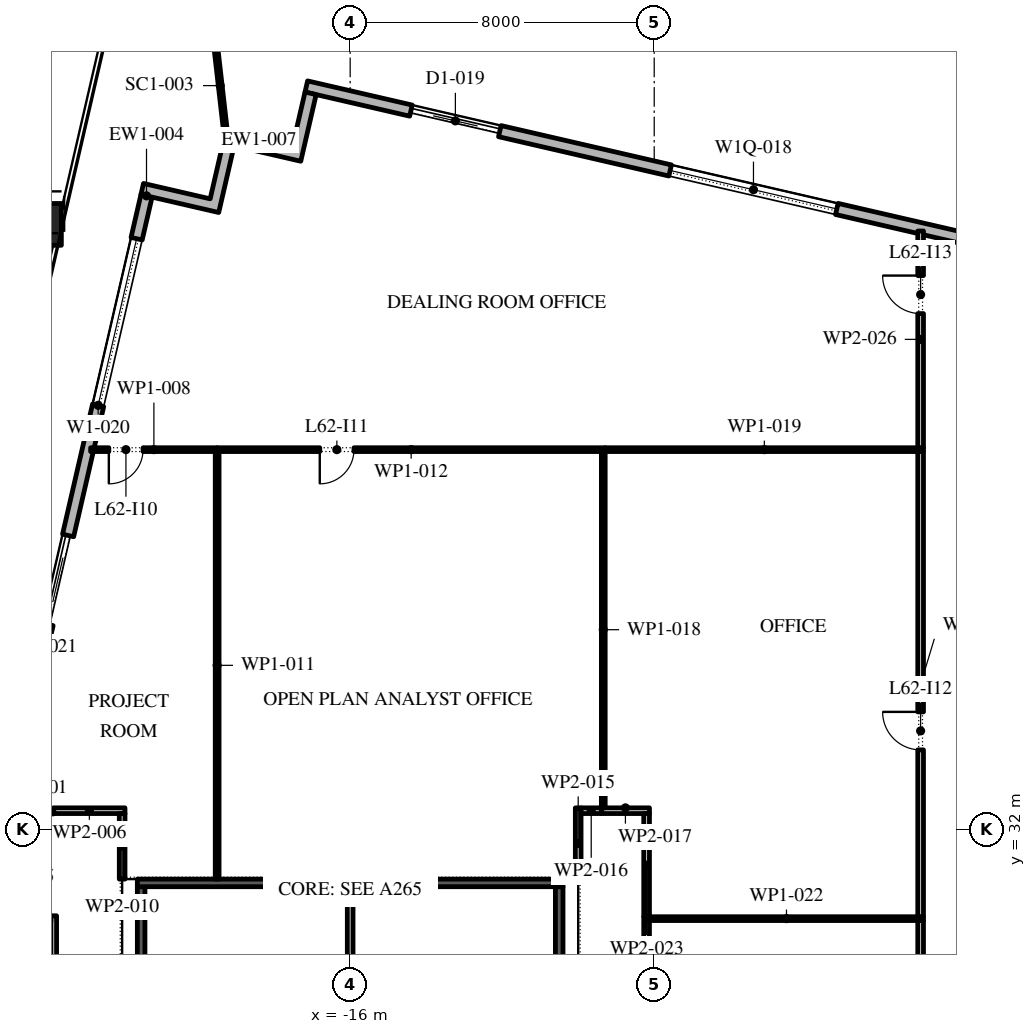
"""IFC4 building model, lengths in metres.
Left out: names, types, materials, properties, quantities, classifications, styles, units other than length and angle.
Written with IfcOpenShell. Run it as: python <this file> out.ifc"""

import sys

from ifc_helpers import new_model, si_unit, direction, frame, frame_2d, origin, origin_2d, place, context, subcontext, project, spatial, polyline, rectangle, outline, extrude, element, fill, save


model = new_model("IFC4")
c1 = context("Model", 3, precision=1e-05, world=origin(), true_north=direction((0.0, 1.0)))
c2 = subcontext(c1, "Body", "Model", "MODEL_VIEW")
j1 = project(units=[si_unit("LENGTHUNIT", "METRE"), si_unit("PLANEANGLEUNIT", "RADIAN")], contexts=[c1])
p1 = place(None, origin())
s1 = spatial("IfcSite", under=j1, at=p1, CompositionType="ELEMENT")
p2 = place(p1, origin())
s2 = spatial("IfcBuilding", under=s1, at=p2, CompositionType="ELEMENT")
p3 = place(p2, frame((0.0, 0.0, 285.0)))
s3 = spatial("IfcBuildingStorey", under=s2, at=p3, CompositionType="ELEMENT", Elevation=285.0)
p4 = place(p3, frame((-24.149, 47.927, 0.0), z_axis=(0.017502025619, 0.075687567741, 0.996977969259), x_axis=(-0.974290512438, 0.225295355862, 0.0)))
e1 = element("IfcColumn", 1, at=p4, inside=s3, PredefinedType="COLUMN", context=c2, shape_type="SweptSolid", body=[
    extrude(rectangle(XDim=1.1, YDim=1.1, at=origin_2d()), origin(), (0.0, 0.0, 1.0), 4.213),
])
p5 = place(p3, frame((29.616, 40.758, 0.0), z_axis=(0.0, 0.0, 1.0), x_axis=(-0.974370532314, 0.224949029246, 0.0)))
e2 = element("IfcWall", 2, at=p5, inside=s3, PredefinedType="STANDARD", context=c2, shape_type="SweptSolid", body=[
    extrude(rectangle(XDim=48.0, YDim=0.3, at=frame_2d((24.0, 0.0))), origin(), (0.0, 0.0, 1.0), 4.0),
])
p6 = place(p5, frame((1.625, 0.0, 0.45)))
e3 = element("IfcOpeningElement", 3, at=p6, cuts=e2, PredefinedType="OPENING", context=c2, shape_type="SweptSolid", body=[
    extrude(rectangle(XDim=4.5, YDim=2.525, at=frame_2d((2.25, 1.262))), frame((0.0, 0.16, 0.0), z_axis=(0.0, -1.0, 0.0), x_axis=(1.0, 0.0, 0.0)), (0.0, 0.0, 1.0), 0.32),
])
p7 = place(p5, frame((10.575, 0.0, 0.0)))
e4 = element("IfcOpeningElement", 4, at=p7, cuts=e2, PredefinedType="OPENING", context=c2, shape_type="SweptSolid", body=[
    extrude(rectangle(XDim=2.4, YDim=3.5, at=frame_2d((1.2, 1.75))), frame((0.0, 0.16, 0.0), z_axis=(0.0, -1.0, 0.0), x_axis=(1.0, 0.0, 0.0)), (0.0, 0.0, 1.0), 0.32),
])
p8 = place(p5, frame((17.575, 0.0, 0.45)))
e5 = element("IfcOpeningElement", 5, at=p8, cuts=e2, PredefinedType="OPENING", context=c2, shape_type="SweptSolid", body=[
    extrude(rectangle(XDim=4.5, YDim=2.45, at=frame_2d((2.25, 1.225))), frame((0.0, 0.16, 0.0), z_axis=(0.0, -1.0, 0.0), x_axis=(1.0, 0.0, 0.0)), (0.0, 0.0, 1.0), 0.32),
])
p9 = place(p5, frame((25.625, 0.0, 0.45)))
e6 = element("IfcOpeningElement", 6, at=p9, cuts=e2, PredefinedType="OPENING", context=c2, shape_type="SweptSolid", body=[
    extrude(rectangle(XDim=4.5, YDim=2.45, at=frame_2d((2.25, 1.225))), frame((0.0, 0.16, 0.0), z_axis=(0.0, -1.0, 0.0), x_axis=(1.0, 0.0, 0.0)), (0.0, 0.0, 1.0), 0.32),
])
p10 = place(p5, frame((33.675, 0.0, 0.45)))
e7 = element("IfcOpeningElement", 7, at=p10, cuts=e2, PredefinedType="OPENING", context=c2, shape_type="SweptSolid", body=[
    extrude(rectangle(XDim=4.5, YDim=2.45, at=frame_2d((2.25, 1.225))), frame((0.0, 0.16, 0.0), z_axis=(0.0, -1.0, 0.0), x_axis=(1.0, 0.0, 0.0)), (0.0, 0.0, 1.0), 0.32),
])
p11 = place(p5, frame((42.775, 0.0, 0.0)))
e8 = element("IfcOpeningElement", 8, at=p11, cuts=e2, PredefinedType="OPENING", context=c2, shape_type="SweptSolid", body=[
    extrude(rectangle(XDim=2.4, YDim=3.5, at=frame_2d((1.2, 1.75))), frame((0.0, 0.16, 0.0), z_axis=(0.0, -1.0, 0.0), x_axis=(1.0, 0.0, 0.0)), (0.0, 0.0, 1.0), 0.32),
])
p12 = place(p3, frame((-21.359, 48.678, 0.0), z_axis=(0.0, 0.0, 1.0), x_axis=(-0.224949198343, -0.974370493275, 0.0)))
e9 = element("IfcWall", 9, at=p12, inside=s3, PredefinedType="STANDARD", context=c2, shape_type="SweptSolid", body=[
    extrude(rectangle(XDim=49.5, YDim=0.3, at=frame_2d((24.75, 0.0))), origin(), (0.0, 0.0, 1.0), 4.0),
])
p13 = place(p12, frame((1.157, 0.0, 0.45)))
e10 = element("IfcOpeningElement", 10, at=p13, cuts=e9, PredefinedType="OPENING", context=c2, shape_type="SweptSolid", body=[
    extrude(rectangle(XDim=4.5, YDim=3.05, at=frame_2d((2.25, 1.525))), frame((0.0, 0.16, 0.0), z_axis=(0.0, -1.0, 0.0), x_axis=(1.0, 0.0, 0.0)), (0.0, 0.0, 1.0), 0.32),
])
p14 = place(p12, frame((9.171, 0.0, 0.0)))
e11 = element("IfcOpeningElement", 11, at=p14, cuts=e9, PredefinedType="OPENING", context=c2, shape_type="SweptSolid", body=[
    extrude(rectangle(XDim=2.4, YDim=3.5, at=frame_2d((1.2, 1.75))), frame((0.0, 0.16, 0.0), z_axis=(0.0, -1.0, 0.0), x_axis=(1.0, 0.0, 0.0)), (0.0, 0.0, 1.0), 0.32),
])
p15 = place(p12, frame((15.236, 0.0, 0.45)))
e12 = element("IfcOpeningElement", 12, at=p15, cuts=e9, PredefinedType="OPENING", context=c2, shape_type="SweptSolid", body=[
    extrude(rectangle(XDim=4.5, YDim=3.05, at=frame_2d((2.25, 1.525))), frame((0.0, 0.16, 0.0), z_axis=(0.0, -1.0, 0.0), x_axis=(1.0, 0.0, 0.0)), (0.0, 0.0, 1.0), 0.32),
])
p16 = place(p12, frame((22.35, 0.0, 0.45)))
e13 = element("IfcOpeningElement", 13, at=p16, cuts=e9, PredefinedType="OPENING", context=c2, shape_type="SweptSolid", body=[
    extrude(rectangle(XDim=4.5, YDim=3.05, at=frame_2d((2.25, 1.525))), frame((0.0, 0.16, 0.0), z_axis=(0.0, -1.0, 0.0), x_axis=(1.0, 0.0, 0.0)), (0.0, 0.0, 1.0), 0.32),
])
p17 = place(p12, frame((29.464, 0.0, 0.45)))
e14 = element("IfcOpeningElement", 14, at=p17, cuts=e9, PredefinedType="OPENING", context=c2, shape_type="SweptSolid", body=[
    extrude(rectangle(XDim=4.5, YDim=3.05, at=frame_2d((2.25, 1.525))), frame((0.0, 0.16, 0.0), z_axis=(0.0, -1.0, 0.0), x_axis=(1.0, 0.0, 0.0)), (0.0, 0.0, 1.0), 0.32),
])
p18 = place(p12, frame((37.628, 0.0, 0.0)))
e15 = element("IfcOpeningElement", 15, at=p18, cuts=e9, PredefinedType="OPENING", context=c2, shape_type="SweptSolid", body=[
    extrude(rectangle(XDim=2.4, YDim=3.325, at=frame_2d((1.2, 1.663))), frame((0.0, 0.16, 0.0), z_axis=(0.0, -1.0, 0.0), x_axis=(1.0, 0.0, 0.0)), (0.0, 0.0, 1.0), 0.32),
])
p19 = place(p12, frame((43.693, 0.0, 0.45)))
e16 = element("IfcOpeningElement", 16, at=p19, cuts=e9, PredefinedType="OPENING", context=c2, shape_type="SweptSolid", body=[
    extrude(rectangle(XDim=4.5, YDim=2.825, at=frame_2d((2.25, 1.413))), frame((0.0, 0.16, 0.0), z_axis=(0.0, -1.0, 0.0), x_axis=(1.0, 0.0, 0.0)), (0.0, 0.0, 1.0), 0.32),
])
p20 = place(p3, origin())
e17 = element("IfcWall", 17, at=p20, inside=s3, PredefinedType="STANDARD", context=c2, shape_type="SweptSolid", body=[
    extrude(outline(polyline([(-21.505, 48.712), (-21.438, 49.004), (-19.684, 48.599), (-19.279, 50.353), (-17.525, 49.948), (-17.188, 51.41), (-16.895, 51.342), (-17.3, 49.588), (-19.054, 49.993), (-19.459, 48.24), (-21.505, 48.712)])), origin(), (0.0, 0.0, 1.0), 4.0),
])
p21 = place(p3, frame((-19.279, 50.353, -0.05), z_axis=(0.0, 0.0, 1.0), x_axis=(-0.113767195916, 0.993507435872, 0.0)))
e18 = element("IfcWall", 18, at=p21, inside=s3, PredefinedType="STANDARD", context=c2, shape_type="SweptSolid", body=[
    extrude(rectangle(XDim=2.466, YDim=0.1, at=frame_2d((1.233, 0.0))), origin(), (0.0, 0.0, 1.0), 4.05),
])
p22 = place(p3, frame((-21.5, 25.75, 0.0), z_axis=(0.0, 0.0, 1.0), x_axis=(0.0, 1.0, 0.0)))
e19 = element("IfcWall", 19, at=p22, inside=s3, PredefinedType="SHEAR", context=c2, shape_type="SweptSolid", body=[
    extrude(rectangle(XDim=4.75, YDim=0.2, at=frame_2d((2.375, 0.0))), origin(), (0.0, 0.0, 1.0), 4.0),
])
p23 = place(p22, frame((1.925, 0.0, 0.0)))
e20 = element("IfcOpeningElement", 20, at=p23, cuts=e19, PredefinedType="OPENING", context=c2, shape_type="SweptSolid", body=[
    extrude(rectangle(XDim=0.9, YDim=2.1, at=frame_2d((0.45, 1.05))), frame((0.0, 0.11, 0.0), z_axis=(0.0, -1.0, 0.0), x_axis=(1.0, 0.0, 0.0)), (0.0, 0.0, 1.0), 0.22),
])
p24 = place(p3, frame((-10.5, 25.75, 0.0), z_axis=(0.0, 0.0, 1.0), x_axis=(0.0, 1.0, 0.0)))
e21 = element("IfcWall", 21, at=p24, inside=s3, PredefinedType="SHEAR", context=c2, shape_type="SweptSolid", body=[
    extrude(rectangle(XDim=4.75, YDim=0.2, at=frame_2d((2.375, 0.0))), origin(), (0.0, 0.0, 1.0), 4.0),
])
p25 = place(p24, frame((1.925, 0.0, 0.0)))
e22 = element("IfcOpeningElement", 22, at=p25, cuts=e21, PredefinedType="OPENING", context=c2, shape_type="SweptSolid", body=[
    extrude(rectangle(XDim=0.9, YDim=2.1, at=frame_2d((0.45, 1.05))), frame((0.0, 0.11, 0.0), z_axis=(0.0, -1.0, 0.0), x_axis=(1.0, 0.0, 0.0)), (0.0, 0.0, 1.0), 0.22),
])
p26 = place(p3, frame((-21.6, 30.6, 0.0), z_axis=(0.0, 0.0, 1.0), x_axis=(1.0, 0.0, 0.0)))
e23 = element("IfcWall", 23, at=p26, inside=s3, PredefinedType="SHEAR", context=c2, shape_type="SweptSolid", body=[
    extrude(rectangle(XDim=11.2, YDim=0.2, at=frame_2d((5.6, 0.0))), origin(), (0.0, 0.0, 1.0), 4.0),
])
p27 = place(p3, frame((-16.0, 25.75, 0.0), z_axis=(0.0, 0.0, 1.0), x_axis=(0.0, 1.0, 0.0)))
e24 = element("IfcWall", 24, at=p27, inside=s3, PredefinedType="PARTITIONING", context=c2, shape_type="SweptSolid", body=[
    extrude(rectangle(XDim=4.75, YDim=0.15, at=frame_2d((2.375, 0.0))), origin(), (0.0, 0.0, 1.0), 4.0),
])
p28 = place(p3, frame((-25.025, 32.49, 0.0), z_axis=(0.0, 0.0, 1.0), x_axis=(1.0, 0.0, 0.0)))
e25 = element("IfcWall", 25, at=p28, inside=s3, PredefinedType="PARTITIONING", context=c2, shape_type="SweptSolid", body=[
    extrude(rectangle(XDim=1.225, YDim=0.15, at=frame_2d((0.612, 0.0))), origin(), (0.0, 0.0, 1.0), 4.0),
])
p29 = place(p3, frame((-23.8, 8.86, 0.0), z_axis=(0.0, 0.0, 1.0), x_axis=(0.0, 1.0, 0.0)))
e26 = element("IfcWall", 26, at=p29, inside=s3, PredefinedType="PARTITIONING", context=c2, shape_type="SweptSolid", body=[
    extrude(rectangle(XDim=20.875, YDim=0.15, at=frame_2d((10.438, 0.0))), origin(), (0.0, 0.0, 1.0), 4.0),
])
p30 = place(p29, frame((7.9, 0.0, 0.0)))
e27 = element("IfcOpeningElement", 27, at=p30, cuts=e26, PredefinedType="OPENING", context=c2, shape_type="SweptSolid", body=[
    extrude(rectangle(XDim=1.0, YDim=2.1, at=frame_2d((0.5, 1.05))), frame((0.0, 0.085, 0.0), z_axis=(0.0, -1.0, 0.0), x_axis=(1.0, 0.0, 0.0)), (0.0, 0.0, 1.0), 0.17),
])
p31 = place(p3, frame((-23.8, 32.5, 0.0), z_axis=(0.0, 0.0, 1.0), x_axis=(1.0, 0.0, 0.0)))
e28 = element("IfcWall", 28, at=p31, inside=s3, PredefinedType="PARTITIONING", context=c2, shape_type="SweptSolid", body=[
    extrude(rectangle(XDim=1.875, YDim=0.15, at=frame_2d((0.938, 0.0))), origin(), (0.0, 0.0, 1.0), 4.0),
])
p32 = place(p3, frame((-22.829, 42.0, 0.0), z_axis=(0.0, 0.0, 1.0), x_axis=(1.0, 0.0, 0.0)))
e29 = element("IfcWall", 29, at=p32, inside=s3, PredefinedType="PARTITIONING", context=c2, shape_type="SweptSolid", body=[
    extrude(rectangle(XDim=3.329, YDim=0.1, at=frame_2d((1.665, 0.0))), origin(), (0.0, 0.0, 1.0), 4.0),
])
p33 = place(p32, frame((0.479, 0.0, 0.0)))
e30 = element("IfcOpeningElement", 30, at=p33, cuts=e29, PredefinedType="OPENING", context=c2, shape_type="SweptSolid", body=[
    extrude(rectangle(XDim=0.9, YDim=2.1, at=frame_2d((0.45, 1.05))), frame((0.0, 0.06, 0.0), z_axis=(0.0, -1.0, 0.0), x_axis=(1.0, 0.0, 0.0)), (0.0, 0.0, 1.0), 0.12),
])
p34 = place(p3, frame((-22.0, 32.425, 0.0), z_axis=(0.0, 0.0, 1.0), x_axis=(0.0, -1.0, 0.0)))
e31 = element("IfcWall", 31, at=p34, inside=s3, PredefinedType="PARTITIONING", context=c2, shape_type="SweptSolid", body=[
    extrude(rectangle(XDim=1.725, YDim=0.15, at=frame_2d((0.863, 0.0))), origin(), (0.0, 0.0, 1.0), 4.0),
])
p35 = place(p3, frame((-19.5, 41.95, 0.0), z_axis=(0.0, 0.0, 1.0), x_axis=(0.0, -1.0, 0.0)))
e32 = element("IfcWall", 32, at=p35, inside=s3, PredefinedType="PARTITIONING", context=c2, shape_type="SweptSolid", body=[
    extrude(rectangle(XDim=11.25, YDim=0.1, at=frame_2d((5.625, 0.0))), origin(), (0.0, 0.0, 1.0), 4.0),
])
p36 = place(p3, frame((-19.5, 42.0, 0.0), z_axis=(0.0, 0.0, 1.0), x_axis=(1.0, 0.0, 0.0)))
e33 = element("IfcWall", 33, at=p36, inside=s3, PredefinedType="PARTITIONING", context=c2, shape_type="SweptSolid", body=[
    extrude(rectangle(XDim=10.21, YDim=0.1, at=frame_2d((5.105, 0.0))), origin(), (0.0, 0.0, 1.0), 4.0),
])
p37 = place(p36, frame((2.7, 0.0, 0.0)))
e34 = element("IfcOpeningElement", 34, at=p37, cuts=e33, PredefinedType="OPENING", context=c2, shape_type="SweptSolid", body=[
    extrude(rectangle(XDim=0.9, YDim=2.1, at=frame_2d((0.45, 1.05))), frame((0.0, 0.06, 0.0), z_axis=(0.0, -1.0, 0.0), x_axis=(1.0, 0.0, 0.0)), (0.0, 0.0, 1.0), 0.12),
])
p38 = place(p3, frame((-10.0, 30.7, 0.0), z_axis=(0.0, 0.0, 1.0), x_axis=(0.0, 1.0, 0.0)))
e35 = element("IfcWall", 35, at=p38, inside=s3, PredefinedType="PARTITIONING", context=c2, shape_type="SweptSolid", body=[
    extrude(rectangle(XDim=1.875, YDim=0.15, at=frame_2d((0.938, 0.0))), origin(), (0.0, 0.0, 1.0), 4.0),
])
p39 = place(p3, frame((-9.925, 32.5, 0.0), z_axis=(0.0, 0.0, 1.0), x_axis=(1.0, 0.0, 0.0)))
e36 = element("IfcWall", 36, at=p39, inside=s3, PredefinedType="PARTITIONING", context=c2, shape_type="SweptSolid", body=[
    extrude(rectangle(XDim=0.535, YDim=0.15, at=frame_2d((0.268, 0.0))), origin(), (0.0, 0.0, 1.0), 4.0),
])
p40 = place(p3, frame((-9.39, 32.5, 0.0), z_axis=(0.0, 0.0, 1.0), x_axis=(1.0, 0.0, 0.0)))
e37 = element("IfcWall", 37, at=p40, inside=s3, PredefinedType="PARTITIONING", context=c2, shape_type="SweptSolid", body=[
    extrude(rectangle(XDim=1.265, YDim=0.15, at=frame_2d((0.632, 0.0))), origin(), (0.0, 0.0, 1.0), 4.0),
])
p41 = place(p3, frame((-9.34, 41.95, 0.0), z_axis=(0.0, 0.0, 1.0), x_axis=(0.0, -1.0, 0.0)))
e38 = element("IfcWall", 38, at=p41, inside=s3, PredefinedType="PARTITIONING", context=c2, shape_type="SweptSolid", body=[
    extrude(rectangle(XDim=9.375, YDim=0.1, at=frame_2d((4.688, 0.0))), origin(), (0.0, 0.0, 1.0), 4.0),
])
p42 = place(p3, frame((-9.29, 42.0, 0.0), z_axis=(0.0, 0.0, 1.0), x_axis=(1.0, 0.0, 0.0)))
e39 = element("IfcWall", 39, at=p42, inside=s3, PredefinedType="PARTITIONING", context=c2, shape_type="SweptSolid", body=[
    extrude(rectangle(XDim=8.375, YDim=0.1, at=frame_2d((4.188, 0.0))), origin(), (0.0, 0.0, 1.0), 4.0),
])
p43 = place(p3, frame((-8.2, 29.71, 0.0), z_axis=(0.0, 0.0, 1.0), x_axis=(0.0, -1.0, 0.0)))
e40 = element("IfcWall", 40, at=p43, inside=s3, PredefinedType="PARTITIONING", context=c2, shape_type="SweptSolid", body=[
    extrude(rectangle(XDim=10.635, YDim=0.15, at=frame_2d((5.317, 0.0))), origin(), (0.0, 0.0, 1.0), 4.0),
])
p44 = place(p43, frame((2.81, 0.0, 0.0)))
e41 = element("IfcOpeningElement", 41, at=p44, cuts=e40, PredefinedType="OPENING", context=c2, shape_type="SweptSolid", body=[
    extrude(rectangle(XDim=1.0, YDim=2.1, at=frame_2d((0.5, 1.05))), frame((0.0, 0.085, 0.0), z_axis=(0.0, -1.0, 0.0), x_axis=(1.0, 0.0, 0.0)), (0.0, 0.0, 1.0), 0.17),
])
p45 = place(p3, frame((-8.125, 29.66, 0.0), z_axis=(0.0, 0.0, 1.0), x_axis=(1.0, 0.0, 0.0)))
e42 = element("IfcWall", 42, at=p45, inside=s3, PredefinedType="PARTITIONING", context=c2, shape_type="SweptSolid", body=[
    extrude(rectangle(XDim=7.21, YDim=0.1, at=frame_2d((3.605, 0.0))), origin(), (0.0, 0.0, 1.0), 4.0),
])
p46 = place(p3, frame((-8.2, 32.425, 0.0), z_axis=(0.0, 0.0, 1.0), x_axis=(0.0, -1.0, 0.0)))
e43 = element("IfcWall", 43, at=p46, inside=s3, PredefinedType="PARTITIONING", context=c2, shape_type="SweptSolid", body=[
    extrude(rectangle(XDim=2.715, YDim=0.15, at=frame_2d((1.357, 0.0))), origin(), (0.0, 0.0, 1.0), 4.0),
])
p47 = place(p3, frame((-0.99, 19.075, 0.0), z_axis=(0.0, 0.0, 1.0), x_axis=(0.0, 1.0, 0.0)))
e44 = element("IfcWall", 44, at=p47, inside=s3, PredefinedType="PARTITIONING", context=c2, shape_type="SweptSolid", body=[
    extrude(rectangle(XDim=10.535, YDim=0.15, at=frame_2d((5.268, 0.0))), origin(), (0.0, 0.0, 1.0), 4.0),
])
p48 = place(p3, frame((-0.99, 29.71, 0.0), z_axis=(0.0, 0.0, 1.0), x_axis=(0.0, 1.0, 0.0)))
e45 = element("IfcWall", 45, at=p48, inside=s3, PredefinedType="PARTITIONING", context=c2, shape_type="SweptSolid", body=[
    extrude(rectangle(XDim=12.24, YDim=0.15, at=frame_2d((6.12, 0.0))), origin(), (0.0, 0.0, 1.0), 4.0),
])
p49 = place(p48, frame((4.39, 0.0, 0.0)))
e46 = element("IfcOpeningElement", 46, at=p49, cuts=e45, PredefinedType="OPENING", context=c2, shape_type="SweptSolid", body=[
    extrude(rectangle(XDim=1.0, YDim=2.1, at=frame_2d((0.5, 1.05))), frame((0.0, 0.085, 0.0), z_axis=(0.0, -1.0, 0.0), x_axis=(1.0, 0.0, 0.0)), (0.0, 0.0, 1.0), 0.17),
])
p50 = place(p3, frame((-0.99, 42.05, 0.0), z_axis=(0.0, 0.0, 1.0), x_axis=(0.0, 1.0, 0.0)))
e47 = element("IfcWall", 47, at=p50, inside=s3, PredefinedType="PARTITIONING", context=c2, shape_type="SweptSolid", body=[
    extrude(rectangle(XDim=5.703, YDim=0.15, at=frame_2d((2.852, 0.0))), origin(), (0.0, 0.0, 1.0), 4.0),
])
p51 = place(p50, frame((3.53, 0.0, 0.0)))
e48 = element("IfcOpeningElement", 48, at=p51, cuts=e47, PredefinedType="OPENING", context=c2, shape_type="SweptSolid", body=[
    extrude(rectangle(XDim=1.0, YDim=2.1, at=frame_2d((0.5, 1.05))), frame((0.0, 0.085, 0.0), z_axis=(0.0, -1.0, 0.0), x_axis=(1.0, 0.0, 0.0)), (0.0, 0.0, 1.0), 0.17),
])
p52 = place(p10, origin())
e49 = element("IfcWindow", 49, at=p52, inside=s3, PartitioningType="DOUBLE_PANEL_VERTICAL", PredefinedType="WINDOW", context=c2, shape_type="SweptSolid", body=[
    extrude(rectangle(XDim=4.5, YDim=2.45, at=frame_2d((2.25, 1.225))), frame((0.0, 0.03, 0.0), z_axis=(0.0, -1.0, 0.0), x_axis=(1.0, 0.0, 0.0)), (0.0, 0.0, 1.0), 0.06),
])
fill(e7, e49)
p53 = place(p11, origin())
e50 = element("IfcDoor", 50, at=p53, inside=s3, OperationType="DOUBLE_DOOR_SLIDING", PredefinedType="DOOR", context=c2, shape_type="SweptSolid", body=[
    extrude(rectangle(XDim=2.4, YDim=3.5, at=frame_2d((1.2, 1.75))), frame((0.0, 0.025, 0.0), z_axis=(0.0, -1.0, 0.0), x_axis=(1.0, 0.0, 0.0)), (0.0, 0.0, 1.0), 0.05),
])
fill(e8, e50)
p54 = place(p13, origin())
e51 = element("IfcWindow", 51, at=p54, inside=s3, PartitioningType="DOUBLE_PANEL_VERTICAL", PredefinedType="WINDOW", context=c2, shape_type="SweptSolid", body=[
    extrude(rectangle(XDim=4.5, YDim=3.05, at=frame_2d((2.25, 1.525))), frame((0.0, 0.03, 0.0), z_axis=(0.0, -1.0, 0.0), x_axis=(1.0, 0.0, 0.0)), (0.0, 0.0, 1.0), 0.06),
])
fill(e10, e51)
p55 = place(p14, origin())
e52 = element("IfcDoor", 52, at=p55, inside=s3, OperationType="DOUBLE_DOOR_SLIDING", PredefinedType="DOOR", context=c2, shape_type="SweptSolid", body=[
    extrude(rectangle(XDim=2.4, YDim=3.5, at=frame_2d((1.2, 1.75))), frame((0.0, 0.025, 0.0), z_axis=(0.0, -1.0, 0.0), x_axis=(1.0, 0.0, 0.0)), (0.0, 0.0, 1.0), 0.05),
])
fill(e11, e52)
p56 = place(p33, frame((0.9, 0.0, 0.0), z_axis=(0.0, 0.0, 1.0), x_axis=(-1.0, 0.0, 0.0)))
e53 = element("IfcDoor", 53, at=p56, inside=s3, OperationType="SINGLE_SWING_LEFT", PredefinedType="DOOR", context=c2, shape_type="SweptSolid", body=[
    extrude(rectangle(XDim=0.9, YDim=2.1, at=frame_2d((0.45, 1.05))), frame((0.0, 0.025, 0.0), z_axis=(0.0, -1.0, 0.0), x_axis=(1.0, 0.0, 0.0)), (0.0, 0.0, 1.0), 0.05),
])
fill(e30, e53)
p57 = place(p37, frame((0.9, 0.0, 0.0), z_axis=(0.0, 0.0, 1.0), x_axis=(-1.0, 0.0, 0.0)))
e54 = element("IfcDoor", 54, at=p57, inside=s3, OperationType="SINGLE_SWING_LEFT", PredefinedType="DOOR", context=c2, shape_type="SweptSolid", body=[
    extrude(rectangle(XDim=0.9, YDim=2.1, at=frame_2d((0.45, 1.05))), frame((0.0, 0.025, 0.0), z_axis=(0.0, -1.0, 0.0), x_axis=(1.0, 0.0, 0.0)), (0.0, 0.0, 1.0), 0.05),
])
fill(e34, e54)
p58 = place(p49, origin())
e55 = element("IfcDoor", 55, at=p58, inside=s3, OperationType="SINGLE_SWING_LEFT", PredefinedType="DOOR", context=c2, shape_type="SweptSolid", body=[
    extrude(rectangle(XDim=1.0, YDim=2.1, at=frame_2d((0.5, 1.05))), frame((0.0, 0.025, 0.0), z_axis=(0.0, -1.0, 0.0), x_axis=(1.0, 0.0, 0.0)), (0.0, 0.0, 1.0), 0.05),
])
fill(e46, e55)
p59 = place(p51, origin())
e56 = element("IfcDoor", 56, at=p59, inside=s3, OperationType="SINGLE_SWING_LEFT", PredefinedType="DOOR", context=c2, shape_type="SweptSolid", body=[
    extrude(rectangle(XDim=1.0, YDim=2.1, at=frame_2d((0.5, 1.05))), frame((0.0, 0.025, 0.0), z_axis=(0.0, -1.0, 0.0), x_axis=(1.0, 0.0, 0.0)), (0.0, 0.0, 1.0), 0.05),
])
fill(e48, e56)
save(model, sys.argv[1])
